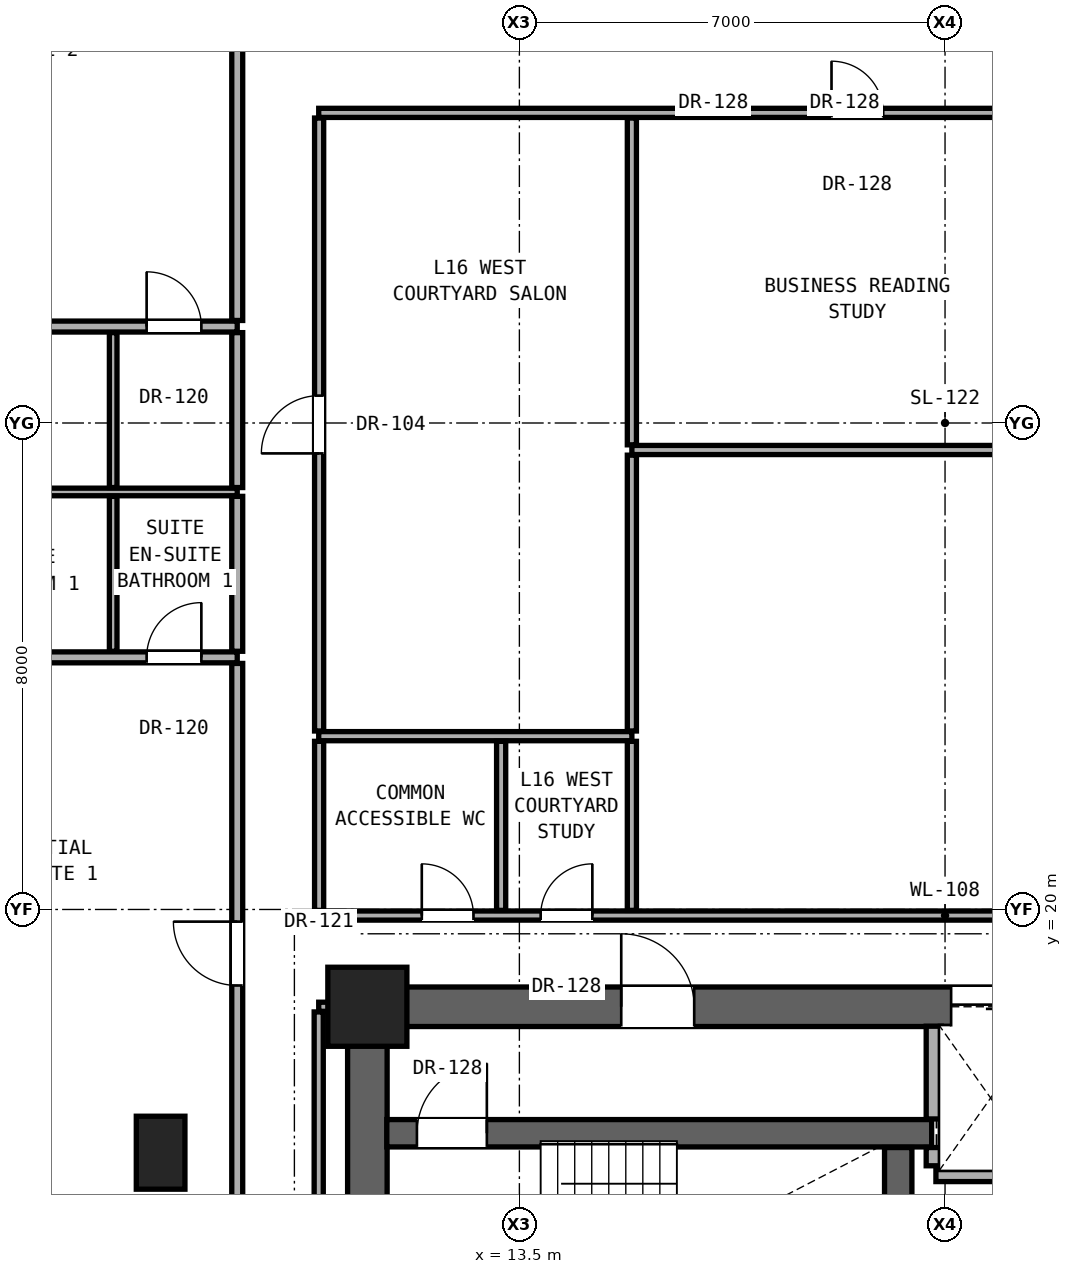
"""IFC4 building model, lengths in metres.
Left out: names, types, materials, properties, quantities, classifications, styles, units other than length and angle.
Written with IfcOpenShell. Run it as: python <this file> out.ifc"""

import sys

from ifc_helpers import new_model, si_unit, direction, frame, frame_2d, origin, origin_2d, place, context, subcontext, project, spatial, rectangle, extrude, element, fill, save


model = new_model("IFC4")
c1 = context("Model", 3, precision=1e-05, world=origin(), true_north=direction((0.0, 1.0)))
c2 = subcontext(c1, "Body", "Model", "MODEL_VIEW")
j1 = project(units=[si_unit("LENGTHUNIT", "METRE"), si_unit("PLANEANGLEUNIT", "RADIAN")], contexts=[c1])
p1 = place(None, origin())
s1 = spatial("IfcSite", under=j1, at=p1, CompositionType="ELEMENT")
p2 = place(p1, origin())
s2 = spatial("IfcBuilding", under=s1, at=p2, CompositionType="ELEMENT")
p3 = place(p2, frame((0.0, 0.0, 58.7)))
s3 = spatial("IfcBuildingStorey", under=s2, at=p3, CompositionType="ELEMENT", Elevation=58.7)
p4 = place(p3, frame((11.0, 18.4, 0.0), z_axis=(0.0, 0.0, 1.0), x_axis=(1.0, 0.0, 0.0)))
e1 = element("IfcColumn", 1, at=p4, inside=s3, PredefinedType="COLUMN", context=c2, shape_type="SweptSolid", body=[
    extrude(rectangle(XDim=1.3, YDim=1.3, at=origin_2d()), origin(), (0.0, 0.0, 1.0), 3.3),
])
p5 = place(p3, frame((7.6, 16.0, 0.0), z_axis=(0.0, 0.0, 1.0), x_axis=(1.0, 0.0, 0.0)))
e2 = element("IfcColumn", 2, at=p5, inside=s3, PredefinedType="PILASTER", context=c2, shape_type="SweptSolid", body=[
    extrude(rectangle(XDim=0.8, YDim=1.2, at=origin_2d()), origin(), (0.0, 0.0, 1.0), 3.3),
])
p6 = place(p3, frame((11.0, 12.4, 0.0), z_axis=(0.0, 0.0, 1.0), x_axis=(0.0, 1.0, 0.0)))
e3 = element("IfcWall", 3, at=p6, inside=s3, PredefinedType="SHEAR", context=c2, shape_type="SweptSolid", body=[
    extrude(rectangle(XDim=6.0, YDim=0.65, at=frame_2d((3.0, 0.0))), origin(), (0.0, 0.0, 1.0), 3.06),
])
p7 = place(p3, frame((11.0, 18.4, 0.0), z_axis=(0.0, 0.0, 1.0), x_axis=(1.0, 0.0, 0.0)))
e4 = element("IfcWall", 4, at=p7, inside=s3, PredefinedType="SHEAR", context=c2, shape_type="SweptSolid", body=[
    extrude(rectangle(XDim=19.0, YDim=0.65, at=frame_2d((9.5, 0.0))), origin(), (0.0, 0.0, 1.0), 3.06),
])
p8 = place(p7, frame((4.175, 0.0, 0.0)))
e5 = element("IfcOpeningElement", 5, at=p8, cuts=e4, PredefinedType="OPENING", context=c2, shape_type="SweptSolid", body=[
    extrude(rectangle(XDim=1.2, YDim=2.25, at=frame_2d((0.6, 1.125))), frame((0.0, 0.335, 0.0), z_axis=(0.0, -1.0, 0.0), x_axis=(1.0, 0.0, 0.0)), (0.0, 0.0, 1.0), 0.67),
])
p9 = place(p7, frame((9.6, 0.0, 0.0)))
e6 = element("IfcOpeningElement", 6, at=p9, cuts=e4, PredefinedType="OPENING", context=c2, shape_type="SweptSolid", body=[
    extrude(rectangle(XDim=1.3, YDim=2.3, at=frame_2d((0.65, 1.15))), frame((0.0, 0.335, 0.0), z_axis=(0.0, -1.0, 0.0), x_axis=(1.0, 0.0, 0.0)), (0.0, 0.0, 1.0), 0.67),
])
p10 = place(p7, frame((11.9, 0.0, 0.0)))
e7 = element("IfcOpeningElement", 7, at=p10, cuts=e4, PredefinedType="OPENING", context=c2, shape_type="SweptSolid", body=[
    extrude(rectangle(XDim=1.3, YDim=2.3, at=frame_2d((0.65, 1.15))), frame((0.0, 0.335, 0.0), z_axis=(0.0, -1.0, 0.0), x_axis=(1.0, 0.0, 0.0)), (0.0, 0.0, 1.0), 0.67),
])
p11 = place(p7, frame((14.3, 0.0, 0.0)))
e8 = element("IfcOpeningElement", 8, at=p11, cuts=e4, PredefinedType="OPENING", context=c2, shape_type="SweptSolid", body=[
    extrude(rectangle(XDim=1.3, YDim=2.3, at=frame_2d((0.65, 1.15))), frame((0.0, 0.335, 0.0), z_axis=(0.0, -1.0, 0.0), x_axis=(1.0, 0.0, 0.0)), (0.0, 0.0, 1.0), 0.67),
])
p12 = place(p7, frame((16.6, 0.0, 0.0)))
e9 = element("IfcOpeningElement", 9, at=p12, cuts=e4, PredefinedType="OPENING", context=c2, shape_type="SweptSolid", body=[
    extrude(rectangle(XDim=1.3, YDim=2.3, at=frame_2d((0.65, 1.15))), frame((0.0, 0.335, 0.0), z_axis=(0.0, -1.0, 0.0), x_axis=(1.0, 0.0, 0.0)), (0.0, 0.0, 1.0), 0.67),
])
p13 = place(p3, frame((20.35, 15.65, 0.0), z_axis=(0.0, 0.0, 1.0), x_axis=(1.0, 0.0, 0.0)))
e10 = element("IfcWall", 10, at=p13, inside=s3, PredefinedType="SOLIDWALL", context=c2, shape_type="SweptSolid", body=[
    extrude(rectangle(XDim=4.15, YDim=0.25, at=frame_2d((2.075, 0.0))), origin(), (0.0, 0.0, 1.0), 3.06),
])
p14 = place(p3, frame((11.32, 16.32, 0.0), z_axis=(0.0, 0.0, 1.0), x_axis=(1.0, 0.0, 0.0)))
e11 = element("IfcWall", 11, at=p14, inside=s3, PredefinedType="SHEAR", context=c2, shape_type="SweptSolid", body=[
    extrude(rectangle(XDim=8.96, YDim=0.45, at=frame_2d((4.48, 0.0))), origin(), (0.0, 0.0, 1.0), 3.06),
])
p15 = place(p14, frame((0.495, 0.0, 0.0)))
e12 = element("IfcOpeningElement", 12, at=p15, cuts=e11, PredefinedType="OPENING", context=c2, shape_type="SweptSolid", body=[
    extrude(rectangle(XDim=1.15, YDim=2.2, at=frame_2d((0.575, 1.1))), frame((0.0, 0.235, 0.0), z_axis=(0.0, -1.0, 0.0), x_axis=(1.0, 0.0, 0.0)), (0.0, 0.0, 1.0), 0.47),
])
p16 = place(p3, frame((10.2, 18.4, 0.0), z_axis=(0.0, 0.0, 1.0), x_axis=(1.0, 0.0, 0.0)))
e13 = element("IfcWall", 13, at=p16, inside=s3, PredefinedType="PARTITIONING", context=c2, shape_type="SweptSolid", body=[
    extrude(rectangle(XDim=0.48, YDim=0.15, at=frame_2d((0.24, 0.0))), origin(), (0.0, 0.0, 1.0), 2.436),
])
p17 = place(p3, frame((10.2, 19.9, 0.0), z_axis=(0.0, 0.0, 1.0), x_axis=(1.0, 0.0, 0.0)))
e14 = element("IfcWall", 14, at=p17, inside=s3, PredefinedType="PARTITIONING", context=c2, shape_type="SweptSolid", body=[
    extrude(rectangle(XDim=20.6, YDim=0.15, at=frame_2d((10.3, 0.0))), origin(), (0.0, 0.0, 1.0), 2.104),
])
p18 = place(p17, frame((1.695, 0.0, 0.0)))
e15 = element("IfcOpeningElement", 15, at=p18, cuts=e14, PredefinedType="OPENING", context=c2, shape_type="SweptSolid", body=[
    extrude(rectangle(XDim=0.85, YDim=2.01, at=frame_2d((0.425, 1.005))), frame((0.0, 0.085, 0.0), z_axis=(0.0, -1.0, 0.0), x_axis=(1.0, 0.0, 0.0)), (0.0, 0.0, 1.0), 0.17),
])
p19 = place(p17, frame((3.65, 0.0, 0.0)))
e16 = element("IfcOpeningElement", 16, at=p19, cuts=e14, PredefinedType="OPENING", context=c2, shape_type="SweptSolid", body=[
    extrude(rectangle(XDim=0.85, YDim=2.01, at=frame_2d((0.425, 1.005))), frame((0.0, 0.085, 0.0), z_axis=(0.0, -1.0, 0.0), x_axis=(1.0, 0.0, 0.0)), (0.0, 0.0, 1.0), 0.17),
])
p20 = place(p17, frame((12.43, 0.0, 0.0)))
e17 = element("IfcOpeningElement", 17, at=p20, cuts=e14, PredefinedType="OPENING", context=c2, shape_type="SweptSolid", body=[
    extrude(rectangle(XDim=0.85, YDim=2.01, at=frame_2d((0.425, 1.005))), frame((0.0, 0.085, 0.0), z_axis=(0.0, -1.0, 0.0), x_axis=(1.0, 0.0, 0.0)), (0.0, 0.0, 1.0), 0.17),
])
p21 = place(p3, frame((10.2, 22.85, 0.0), z_axis=(0.0, 0.0, 1.0), x_axis=(1.0, 0.0, 0.0)))
e18 = element("IfcWall", 18, at=p21, inside=s3, PredefinedType="PARTITIONING", context=c2, shape_type="SweptSolid", body=[
    extrude(rectangle(XDim=5.15, YDim=0.15, at=frame_2d((2.575, 0.0))), origin(), (0.0, 0.0, 1.0), 2.104),
])
p22 = place(p3, frame((-0.64, 24.146, 0.0), z_axis=(0.0, 0.0, 1.0), x_axis=(1.0, 0.0, 0.0)))
e19 = element("IfcWall", 19, at=p22, inside=s3, PredefinedType="PARTITIONING", context=c2, shape_type="SweptSolid", body=[
    extrude(rectangle(XDim=9.5, YDim=0.18, at=frame_2d((4.75, 0.0))), origin(), (0.0, 0.0, 1.0), 2.125),
])
p23 = place(p22, frame((3.625, 0.0, 0.0)))
e20 = element("IfcOpeningElement", 20, at=p23, cuts=e19, PredefinedType="OPENING", context=c2, shape_type="SweptSolid", body=[
    extrude(rectangle(XDim=0.85, YDim=2.01, at=frame_2d((0.425, 1.005))), frame((0.0, 0.1, 0.0), z_axis=(0.0, -1.0, 0.0), x_axis=(1.0, 0.0, 0.0)), (0.0, 0.0, 1.0), 0.2),
])
p24 = place(p22, frame((8.01, 0.0, 0.0)))
e21 = element("IfcOpeningElement", 21, at=p24, cuts=e19, PredefinedType="OPENING", context=c2, shape_type="SweptSolid", body=[
    extrude(rectangle(XDim=0.9, YDim=2.1, at=frame_2d((0.45, 1.05))), frame((0.0, 0.1, 0.0), z_axis=(0.0, -1.0, 0.0), x_axis=(1.0, 0.0, 0.0)), (0.0, 0.0, 1.0), 0.2),
])
p25 = place(p3, frame((-0.64, 26.866, 0.0), z_axis=(0.0, 0.0, 1.0), x_axis=(1.0, 0.0, 0.0)))
e22 = element("IfcWall", 22, at=p25, inside=s3, PredefinedType="PARTITIONING", context=c2, shape_type="SweptSolid", body=[
    extrude(rectangle(XDim=9.5, YDim=0.125, at=frame_2d((4.75, 0.0))), origin(), (0.0, 0.0, 1.0), 2.125),
])
p26 = place(p3, frame((15.35, 27.556, 0.0), z_axis=(0.0, 0.0, 1.0), x_axis=(1.0, 0.0, 0.0)))
e23 = element("IfcWall", 23, at=p26, inside=s3, PredefinedType="PARTITIONING", context=c2, shape_type="SweptSolid", body=[
    extrude(rectangle(XDim=15.45, YDim=0.15, at=frame_2d((7.725, 0.0))), origin(), (0.0, 0.0, 1.0), 2.104),
])
p27 = place(p3, frame((-0.64, 29.586, 0.0), z_axis=(0.0, 0.0, 1.0), x_axis=(1.0, 0.0, 0.0)))
e24 = element("IfcWall", 24, at=p27, inside=s3, PredefinedType="PARTITIONING", context=c2, shape_type="SweptSolid", body=[
    extrude(rectangle(XDim=9.5, YDim=0.18, at=frame_2d((4.75, 0.0))), origin(), (0.0, 0.0, 1.0), 2.125),
])
p28 = place(p27, frame((3.625, 0.0, 0.0)))
e25 = element("IfcOpeningElement", 25, at=p28, cuts=e24, PredefinedType="OPENING", context=c2, shape_type="SweptSolid", body=[
    extrude(rectangle(XDim=0.85, YDim=2.01, at=frame_2d((0.425, 1.005))), frame((0.0, 0.1, 0.0), z_axis=(0.0, -1.0, 0.0), x_axis=(1.0, 0.0, 0.0)), (0.0, 0.0, 1.0), 0.2),
])
p29 = place(p27, frame((8.01, 0.0, 0.0)))
e26 = element("IfcOpeningElement", 26, at=p29, cuts=e24, PredefinedType="OPENING", context=c2, shape_type="SweptSolid", body=[
    extrude(rectangle(XDim=0.9, YDim=2.1, at=frame_2d((0.45, 1.05))), frame((0.0, 0.1, 0.0), z_axis=(0.0, -1.0, 0.0), x_axis=(1.0, 0.0, 0.0)), (0.0, 0.0, 1.0), 0.2),
])
p30 = place(p3, frame((10.2, 33.1, 0.0), z_axis=(0.0, 0.0, 1.0), x_axis=(1.0, 0.0, 0.0)))
e27 = element("IfcWall", 27, at=p30, inside=s3, PredefinedType="PARTITIONING", context=c2, shape_type="SweptSolid", body=[
    extrude(rectangle(XDim=20.6, YDim=0.15, at=frame_2d((10.3, 0.0))), origin(), (0.0, 0.0, 1.0), 2.104),
])
p31 = place(p30, frame((8.433, 0.0, 0.0)))
e28 = element("IfcOpeningElement", 28, at=p31, cuts=e27, PredefinedType="OPENING", context=c2, shape_type="SweptSolid", body=[
    extrude(rectangle(XDim=0.85, YDim=2.01, at=frame_2d((0.425, 1.005))), frame((0.0, 0.085, 0.0), z_axis=(0.0, -1.0, 0.0), x_axis=(1.0, 0.0, 0.0)), (0.0, 0.0, 1.0), 0.17),
])
p32 = place(p30, frame((16.138, 0.0, 0.0)))
e29 = element("IfcOpeningElement", 29, at=p32, cuts=e27, PredefinedType="OPENING", context=c2, shape_type="SweptSolid", body=[
    extrude(rectangle(XDim=0.85, YDim=2.01, at=frame_2d((0.425, 1.005))), frame((0.0, 0.085, 0.0), z_axis=(0.0, -1.0, 0.0), x_axis=(1.0, 0.0, 0.0)), (0.0, 0.0, 1.0), 0.17),
])
p33 = place(p3, frame((6.82, 24.246, 0.0), z_axis=(0.0, 0.0, 1.0), x_axis=(0.0, 1.0, 0.0)))
e30 = element("IfcWall", 30, at=p33, inside=s3, PredefinedType="PARTITIONING", context=c2, shape_type="SweptSolid", body=[
    extrude(rectangle(XDim=2.547, YDim=0.125, at=frame_2d((1.274, 0.0))), origin(), (0.0, 0.0, 1.0), 2.279),
])
p34 = place(p3, frame((6.82, 26.938, 0.0), z_axis=(0.0, 0.0, 1.0), x_axis=(0.0, 1.0, 0.0)))
e31 = element("IfcWall", 31, at=p34, inside=s3, PredefinedType="PARTITIONING", context=c2, shape_type="SweptSolid", body=[
    extrude(rectangle(XDim=2.548, YDim=0.125, at=frame_2d((1.274, 0.0))), origin(), (0.0, 0.0, 1.0), 3.06),
])
p35 = place(p3, frame((8.86, 14.504, 0.0), z_axis=(0.0, 0.0, 1.0), x_axis=(0.0, 1.0, 0.0)))
e32 = element("IfcWall", 32, at=p35, inside=s3, PredefinedType="PARTITIONING", context=c2, shape_type="SweptSolid", body=[
    extrude(rectangle(XDim=9.542, YDim=0.18, at=frame_2d((4.771, 0.0))), origin(), (0.0, 0.0, 1.0), 2.436),
])
p36 = place(p35, frame((4.246, 0.0, 0.0)))
e33 = element("IfcOpeningElement", 33, at=p36, cuts=e32, PredefinedType="OPENING", context=c2, shape_type="SweptSolid", body=[
    extrude(rectangle(XDim=1.05, YDim=2.2, at=frame_2d((0.525, 1.1))), frame((0.0, 0.1, 0.0), z_axis=(0.0, -1.0, 0.0), x_axis=(1.0, 0.0, 0.0)), (0.0, 0.0, 1.0), 0.2),
])
p37 = place(p3, frame((8.86, 24.246, 0.0), z_axis=(0.0, 0.0, 1.0), x_axis=(0.0, 1.0, 0.0)))
e34 = element("IfcWall", 34, at=p37, inside=s3, PredefinedType="PARTITIONING", context=c2, shape_type="SweptSolid", body=[
    extrude(rectangle(XDim=2.547, YDim=0.18, at=frame_2d((1.274, 0.0))), origin(), (0.0, 0.0, 1.0), 2.279),
])
p38 = place(p3, frame((8.86, 26.938, 0.0), z_axis=(0.0, 0.0, 1.0), x_axis=(0.0, 1.0, 0.0)))
e35 = element("IfcWall", 35, at=p38, inside=s3, PredefinedType="PARTITIONING", context=c2, shape_type="SweptSolid", body=[
    extrude(rectangle(XDim=2.548, YDim=0.18, at=frame_2d((1.274, 0.0))), origin(), (0.0, 0.0, 1.0), 3.06),
])
p39 = place(p3, frame((8.86, 29.686, 0.0), z_axis=(0.0, 0.0, 1.0), x_axis=(0.0, 1.0, 0.0)))
e36 = element("IfcWall", 36, at=p39, inside=s3, PredefinedType="PARTITIONING", context=c2, shape_type="SweptSolid", body=[
    extrude(rectangle(XDim=11.81, YDim=0.18, at=frame_2d((5.905, 0.0))), origin(), (0.0, 0.0, 1.0), 2.279),
])
p40 = place(p39, frame((5.38, 0.0, 0.0)))
e37 = element("IfcOpeningElement", 37, at=p40, cuts=e36, PredefinedType="OPENING", context=c2, shape_type="SweptSolid", body=[
    extrude(rectangle(XDim=1.05, YDim=2.2, at=frame_2d((0.525, 1.1))), frame((0.0, 0.1, 0.0), z_axis=(0.0, -1.0, 0.0), x_axis=(1.0, 0.0, 0.0)), (0.0, 0.0, 1.0), 0.2),
])
p41 = place(p3, frame((10.2, 12.335, 0.0), z_axis=(0.0, 0.0, 1.0), x_axis=(0.0, 1.0, 0.0)))
e38 = element("IfcWall", 38, at=p41, inside=s3, PredefinedType="PARTITIONING", context=c2, shape_type="SweptSolid", body=[
    extrude(rectangle(XDim=5.98, YDim=0.15, at=frame_2d((2.99, 0.0))), origin(), (0.0, 0.0, 1.0), 2.436),
])
p42 = place(p3, frame((10.207, 19.985, 0.0), z_axis=(0.0, 0.0, 1.0), x_axis=(0.0, 1.0, 0.0)))
e39 = element("IfcWall", 39, at=p42, inside=s3, PredefinedType="PARTITIONING", context=c2, shape_type="SweptSolid", body=[
    extrude(rectangle(XDim=2.78, YDim=0.15, at=frame_2d((1.39, 0.0))), origin(), (0.0, 0.0, 1.0), 3.06),
])
p43 = place(p3, frame((10.207, 22.935, 0.0), z_axis=(0.0, 0.0, 1.0), x_axis=(0.0, 1.0, 0.0)))
e40 = element("IfcWall", 40, at=p43, inside=s3, PredefinedType="PARTITIONING", context=c2, shape_type="SweptSolid", body=[
    extrude(rectangle(XDim=10.08, YDim=0.15, at=frame_2d((5.04, 0.0))), origin(), (0.0, 0.0, 1.0), 2.279),
])
p44 = place(p43, frame((4.565, 0.0, 0.0)))
e41 = element("IfcOpeningElement", 41, at=p44, cuts=e40, PredefinedType="OPENING", context=c2, shape_type="SweptSolid", body=[
    extrude(rectangle(XDim=0.95, YDim=2.15, at=frame_2d((0.475, 1.075))), frame((0.0, 0.085, 0.0), z_axis=(0.0, -1.0, 0.0), x_axis=(1.0, 0.0, 0.0)), (0.0, 0.0, 1.0), 0.17),
])
for number, where, z_axis, x_axis in (
    (42, (13.2, 19.985, 0.0), (0.0, 0.0, 1.0), (0.0, 1.0, 0.0)),
    (43, (15.35, 19.985, 0.0), (0.0, 0.0, 1.0), (0.0, 1.0, 0.0)),
):
    element("IfcWall", number, at=place(p3, frame(where, z_axis=z_axis, x_axis=x_axis)), inside=s3, PredefinedType="PARTITIONING", context=c2, shape_type="SweptSolid", body=[
        extrude(rectangle(XDim=2.78, YDim=0.15, at=frame_2d((1.39, 0.0))), origin(), (0.0, 0.0, 1.0), 3.06),
    ])
p45 = place(p3, frame((15.35, 22.935, 0.0), z_axis=(0.0, 0.0, 1.0), x_axis=(0.0, 1.0, 0.0)))
e44 = element("IfcWall", 44, at=p45, inside=s3, PredefinedType="PARTITIONING", context=c2, shape_type="SweptSolid", body=[
    extrude(rectangle(XDim=4.536, YDim=0.15, at=frame_2d((2.268, 0.0))), origin(), (0.0, 0.0, 1.0), 2.104),
])
p46 = place(p3, frame((15.35, 27.641, 0.0), z_axis=(0.0, 0.0, 1.0), x_axis=(0.0, 1.0, 0.0)))
e45 = element("IfcWall", 45, at=p46, inside=s3, PredefinedType="PARTITIONING", context=c2, shape_type="SweptSolid", body=[
    extrude(rectangle(XDim=5.374, YDim=0.15, at=frame_2d((2.687, 0.0))), origin(), (0.0, 0.0, 1.0), 2.104),
])
p47 = place(p3, frame((19.73, 13.355, 0.0), z_axis=(0.0, 0.0, 1.0), x_axis=(0.0, 1.0, 0.0)))
e46 = element("IfcWall", 46, at=p47, inside=s3, PredefinedType="SHEAR", context=c2, shape_type="SweptSolid", body=[
    extrude(rectangle(XDim=2.73, YDim=0.45, at=frame_2d((1.365, 0.0))), origin(), (0.0, 0.0, 1.0), 3.06),
])
p48 = place(p3, frame((20.315, 15.785, 0.0), z_axis=(0.0, 0.0, 1.0), x_axis=(0.0, 1.0, 0.0)))
e47 = element("IfcWall", 47, at=p48, inside=s3, PredefinedType="SOLIDWALL", context=c2, shape_type="SweptSolid", body=[
    extrude(rectangle(XDim=0.3, YDim=0.25, at=frame_2d((0.15, 0.0))), origin(), (0.0, 0.0, 1.0), 3.06),
])
p49 = place(p3, frame((20.315, 16.555, 0.0), z_axis=(0.0, 0.0, 1.0), x_axis=(0.0, 1.0, 0.0)))
e48 = element("IfcWall", 48, at=p49, inside=s3, PredefinedType="SOLIDWALL", context=c2, shape_type="SweptSolid", body=[
    extrude(rectangle(XDim=1.525, YDim=0.25, at=frame_2d((0.763, 0.0))), origin(), (0.0, 0.0, 1.0), 3.06),
])
p50 = place(p8, origin())
e49 = element("IfcDoor", 49, at=p50, inside=s3, OperationType="SINGLE_SWING_LEFT", PredefinedType="DOOR", context=c2, shape_type="SweptSolid", body=[
    extrude(rectangle(XDim=1.2, YDim=2.25, at=frame_2d((0.6, 1.125))), frame((0.0, 0.025, 0.0), z_axis=(0.0, -1.0, 0.0), x_axis=(1.0, 0.0, 0.0)), (0.0, 0.0, 1.0), 0.05),
])
fill(e5, e49)
p51 = place(p15, origin())
e50 = element("IfcDoor", 50, at=p51, inside=s3, OperationType="SINGLE_SWING_RIGHT", PredefinedType="DOOR", context=c2, shape_type="SweptSolid", body=[
    extrude(rectangle(XDim=1.15, YDim=2.2, at=frame_2d((0.575, 1.1))), frame((0.0, 0.025, 0.0), z_axis=(0.0, -1.0, 0.0), x_axis=(1.0, 0.0, 0.0)), (0.0, 0.0, 1.0), 0.05),
])
fill(e12, e50)
p52 = place(p18, origin())
e51 = element("IfcDoor", 51, at=p52, inside=s3, OperationType="SINGLE_SWING_LEFT", PredefinedType="DOOR", context=c2, shape_type="SweptSolid", body=[
    extrude(rectangle(XDim=0.85, YDim=2.01, at=frame_2d((0.425, 1.005))), frame((0.0, 0.025, 0.0), z_axis=(0.0, -1.0, 0.0), x_axis=(1.0, 0.0, 0.0)), (0.0, 0.0, 1.0), 0.05),
])
fill(e15, e51)
p53 = place(p36, origin())
e52 = element("IfcDoor", 52, at=p53, inside=s3, OperationType="SINGLE_SWING_RIGHT", PredefinedType="DOOR", context=c2, shape_type="SweptSolid", body=[
    extrude(rectangle(XDim=1.05, YDim=2.2, at=frame_2d((0.525, 1.1))), frame((0.0, 0.025, 0.0), z_axis=(0.0, -1.0, 0.0), x_axis=(1.0, 0.0, 0.0)), (0.0, 0.0, 1.0), 0.05),
])
fill(e33, e52)
p54 = place(p24, origin())
e53 = element("IfcDoor", 53, at=p54, inside=s3, OperationType="SINGLE_SWING_RIGHT", PredefinedType="DOOR", context=c2, shape_type="SweptSolid", body=[
    extrude(rectangle(XDim=0.9, YDim=2.1, at=frame_2d((0.45, 1.05))), frame((0.0, 0.025, 0.0), z_axis=(0.0, -1.0, 0.0), x_axis=(1.0, 0.0, 0.0)), (0.0, 0.0, 1.0), 0.05),
])
fill(e21, e53)
p55 = place(p29, origin())
e54 = element("IfcDoor", 54, at=p55, inside=s3, OperationType="SINGLE_SWING_LEFT", PredefinedType="DOOR", context=c2, shape_type="SweptSolid", body=[
    extrude(rectangle(XDim=0.9, YDim=2.1, at=frame_2d((0.45, 1.05))), frame((0.0, 0.025, 0.0), z_axis=(0.0, -1.0, 0.0), x_axis=(1.0, 0.0, 0.0)), (0.0, 0.0, 1.0), 0.05),
])
fill(e26, e54)
p56 = place(p19, origin())
e55 = element("IfcDoor", 55, at=p56, inside=s3, OperationType="SINGLE_SWING_RIGHT", PredefinedType="DOOR", context=c2, shape_type="SweptSolid", body=[
    extrude(rectangle(XDim=0.85, YDim=2.01, at=frame_2d((0.425, 1.005))), frame((0.0, 0.025, 0.0), z_axis=(0.0, -1.0, 0.0), x_axis=(1.0, 0.0, 0.0)), (0.0, 0.0, 1.0), 0.05),
])
fill(e16, e55)
p57 = place(p44, origin())
e56 = element("IfcDoor", 56, at=p57, inside=s3, OperationType="SINGLE_SWING_LEFT", PredefinedType="DOOR", context=c2, shape_type="SweptSolid", body=[
    extrude(rectangle(XDim=0.95, YDim=2.15, at=frame_2d((0.475, 1.075))), frame((0.0, 0.025, 0.0), z_axis=(0.0, -1.0, 0.0), x_axis=(1.0, 0.0, 0.0)), (0.0, 0.0, 1.0), 0.05),
])
fill(e41, e56)
p58 = place(p31, origin())
e57 = element("IfcDoor", 57, at=p58, inside=s3, OperationType="SINGLE_SWING_LEFT", PredefinedType="DOOR", context=c2, shape_type="SweptSolid", body=[
    extrude(rectangle(XDim=0.85, YDim=2.01, at=frame_2d((0.425, 1.005))), frame((0.0, 0.025, 0.0), z_axis=(0.0, -1.0, 0.0), x_axis=(1.0, 0.0, 0.0)), (0.0, 0.0, 1.0), 0.05),
])
fill(e28, e57)
p59 = place(p9, origin())
e58 = element("IfcDoor", 58, at=p59, inside=s3, OperationType="DOUBLE_DOOR_SLIDING", PredefinedType="DOOR", context=c2, shape_type="SweptSolid", body=[
    extrude(rectangle(XDim=1.3, YDim=2.3, at=frame_2d((0.65, 1.15))), frame((0.0, 0.025, 0.0), z_axis=(0.0, -1.0, 0.0), x_axis=(1.0, 0.0, 0.0)), (0.0, 0.0, 1.0), 0.05),
])
fill(e6, e58)
save(model, sys.argv[1])
